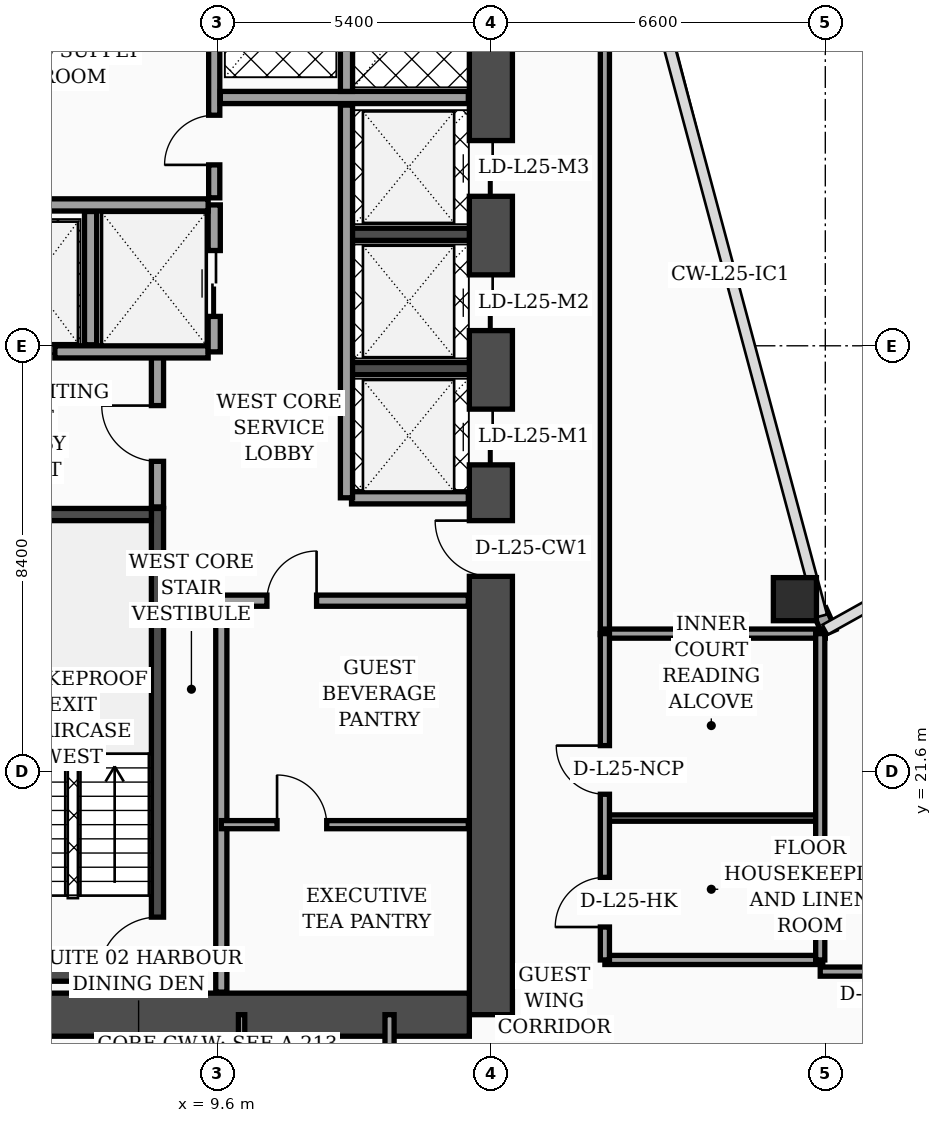
"""IFC4 building model, lengths in metres.
Left out: names, types, materials, properties, quantities, classifications, styles, units other than length and angle.
Written with IfcOpenShell. Run it as: python <this file> out.ifc"""

import sys

from ifc_helpers import new_model, si_unit, direction, frame, frame_2d, origin, origin_2d, place, context, subcontext, project, spatial, rectangle, hollow_rectangle, extrude, element, fill, save


model = new_model("IFC4")
c1 = context("Model", 3, precision=1e-05, world=origin(), true_north=direction((0.0, 1.0)))
c2 = subcontext(c1, "Body", "Model", "MODEL_VIEW")
j1 = project(units=[si_unit("LENGTHUNIT", "METRE"), si_unit("PLANEANGLEUNIT", "RADIAN")], contexts=[c1])
p1 = place(None, origin())
s1 = spatial("IfcSite", under=j1, at=p1, CompositionType="ELEMENT")
p2 = place(p1, origin())
s2 = spatial("IfcBuilding", under=s1, at=p2, CompositionType="ELEMENT")
p3 = place(p2, frame((0.0, 0.0, 105.0)))
s3 = spatial("IfcBuildingStorey", under=s2, at=p3, CompositionType="ELEMENT", Elevation=105.0)
p4 = place(p3, frame((15.0, 16.8, 0.0), z_axis=(0.0, 0.0, 1.0), x_axis=(0.0, 1.0, 0.0)))
e1 = element("IfcWall", 1, at=p4, inside=s3, PredefinedType="SHEAR", context=c2, shape_type="SweptSolid", body=[
    extrude(rectangle(XDim=21.6, YDim=0.85, at=frame_2d((10.8, 0.0))), origin(), (0.0, 0.0, 1.0), 3.56),
])
p5 = place(p4, frame((8.65, 0.0, 0.0)))
e2 = element("IfcOpeningElement", 2, at=p5, cuts=e1, PredefinedType="OPENING", context=c2, shape_type="SweptSolid", body=[
    extrude(rectangle(XDim=1.1, YDim=2.2, at=frame_2d((0.55, 1.1))), frame((0.0, 0.435, 0.0), z_axis=(0.0, -1.0, 0.0), x_axis=(1.0, 0.0, 0.0)), (0.0, 0.0, 1.0), 0.87),
])
p6 = place(p4, frame((10.85, 0.0, 0.0)))
e3 = element("IfcOpeningElement", 3, at=p6, cuts=e1, PredefinedType="OPENING", context=c2, shape_type="SweptSolid", body=[
    extrude(rectangle(XDim=1.1, YDim=2.2, at=frame_2d((0.55, 1.1))), frame((0.0, 0.435, 0.0), z_axis=(0.0, -1.0, 0.0), x_axis=(1.0, 0.0, 0.0)), (0.0, 0.0, 1.0), 0.87),
])
p7 = place(p4, frame((13.5, 0.0, 0.0)))
e4 = element("IfcOpeningElement", 4, at=p7, cuts=e1, PredefinedType="OPENING", context=c2, shape_type="SweptSolid", body=[
    extrude(rectangle(XDim=1.1, YDim=2.2, at=frame_2d((0.55, 1.1))), frame((0.0, 0.435, 0.0), z_axis=(0.0, -1.0, 0.0), x_axis=(1.0, 0.0, 0.0)), (0.0, 0.0, 1.0), 0.87),
])
p8 = place(p4, frame((16.15, 0.0, 0.0)))
e5 = element("IfcOpeningElement", 5, at=p8, cuts=e1, PredefinedType="OPENING", context=c2, shape_type="SweptSolid", body=[
    extrude(rectangle(XDim=1.1, YDim=2.2, at=frame_2d((0.55, 1.1))), frame((0.0, 0.435, 0.0), z_axis=(0.0, -1.0, 0.0), x_axis=(1.0, 0.0, 0.0)), (0.0, 0.0, 1.0), 0.87),
])
p9 = place(p3, frame((4.625, 16.8, 0.0), z_axis=(0.0, 0.0, 1.0), x_axis=(1.0, 0.0, 0.0)))
e6 = element("IfcWall", 6, at=p9, inside=s3, PredefinedType="SHEAR", context=c2, shape_type="SweptSolid", body=[
    extrude(rectangle(XDim=9.95, YDim=0.85, at=frame_2d((4.975, 0.0))), origin(), (0.0, 0.0, 1.0), 3.56),
])
p10 = place(p3, frame((8.42, 17.225, 0.0), z_axis=(0.0, 0.0, 1.0), x_axis=(0.0, 1.0, 0.0)))
e7 = element("IfcWall", 7, at=p10, inside=s3, PredefinedType="SOLIDWALL", context=c2, shape_type="SweptSolid", body=[
    extrude(rectangle(XDim=9.565, YDim=0.24, at=frame_2d((4.782, 0.0))), origin(), (0.0, 0.0, 1.0), 3.56),
])
p11 = place(p10, frame((0.35, 0.0, 0.0)))
e8 = element("IfcOpeningElement", 8, at=p11, cuts=e7, PredefinedType="OPENING", context=c2, shape_type="SweptSolid", body=[
    extrude(rectangle(XDim=1.15, YDim=2.2, at=frame_2d((0.575, 1.1))), frame((0.0, 0.13, 0.0), z_axis=(0.0, -1.0, 0.0), x_axis=(1.0, 0.0, 0.0)), (0.0, 0.0, 1.0), 0.26),
])
for number, where, z_axis, x_axis in (
    (9, (5.2, 17.58, 0.0), (0.0, 0.0, 1.0), (1.0, 0.0, 0.0)),
    (10, (5.2, 26.67, 0.0), (0.0, 0.0, 1.0), (1.0, 0.0, 0.0)),
):
    element("IfcWall", number, at=place(p3, frame(where, z_axis=z_axis, x_axis=x_axis)), inside=s3, PredefinedType="SOLIDWALL", context=c2, shape_type="SweptSolid", body=[
        extrude(rectangle(XDim=3.1, YDim=0.24, at=frame_2d((1.55, 0.0))), origin(), (0.0, 0.0, 1.0), 3.56),
    ])
for number, where, z_axis, x_axis in (
    (11, (12.18, 29.55, 0.0), (0.0, 0.0, 1.0), (1.0, 0.0, 0.0)),
    (12, (12.18, 32.2, 0.0), (0.0, 0.0, 1.0), (1.0, 0.0, 0.0)),
):
    element("IfcWall", number, at=place(p3, frame(where, z_axis=z_axis, x_axis=x_axis)), inside=s3, PredefinedType="SOLIDWALL", context=c2, shape_type="SweptSolid", body=[
        extrude(rectangle(XDim=2.395, YDim=0.24, at=frame_2d((1.198, 0.0))), origin(), (0.0, 0.0, 1.0), 3.56),
    ])
p12 = place(p3, frame((21.0, 25.0, 0.0), z_axis=(0.0, 0.0, 1.0), x_axis=(1.0, 0.0, 0.0)))
e13 = element("IfcColumn", 13, at=p12, inside=s3, PredefinedType="COLUMN", context=c2, shape_type="SweptSolid", body=[
    extrude(hollow_rectangle(XDim=0.85, YDim=0.85, WallThickness=0.036, at=origin_2d()), origin(), (0.0, 0.0, 1.0), 3.56),
])
p13 = place(p3, frame((21.68, 24.34, 0.0), z_axis=(0.0, 0.0, 1.0), x_axis=(-0.40758134973, 0.913168901875, 0.0)))
e14 = element("IfcWall", 14, at=p13, inside=s3, PredefinedType="SOLIDWALL", context=c2, shape_type="SweptSolid", body=[
    extrude(rectangle(XDim=0.471, YDim=0.28, at=frame_2d((0.235, 0.0))), origin(), (0.0, 0.0, 1.0), 3.56),
])
p14 = place(p3, frame((8.42, 26.82, 0.0), z_axis=(0.0, 0.0, 1.0), x_axis=(0.0, 1.0, 0.0)))
e15 = element("IfcWall", 15, at=p14, inside=s3, PredefinedType="SOLIDWALL", context=c2, shape_type="SweptSolid", body=[
    extrude(rectangle(XDim=3.0, YDim=0.24, at=frame_2d((1.5, 0.0))), origin(), (0.0, 0.0, 1.0), 3.56),
])
p15 = place(p14, frame((0.9, 0.0, 0.0)))
e16 = element("IfcOpeningElement", 16, at=p15, cuts=e15, PredefinedType="OPENING", context=c2, shape_type="SweptSolid", body=[
    extrude(rectangle(XDim=1.1, YDim=2.2, at=frame_2d((0.55, 1.1))), frame((0.0, 0.13, 0.0), z_axis=(0.0, -1.0, 0.0), x_axis=(1.0, 0.0, 0.0)), (0.0, 0.0, 1.0), 0.26),
])
p16 = place(p3, frame((4.645, 29.88, 0.0), z_axis=(0.0, 0.0, 1.0), x_axis=(1.0, 0.0, 0.0)))
e17 = element("IfcWall", 17, at=p16, inside=s3, PredefinedType="SOLIDWALL", context=c2, shape_type="SweptSolid", body=[
    extrude(rectangle(XDim=4.775, YDim=0.24, at=frame_2d((2.387, 0.0))), origin(), (0.0, 0.0, 1.0), 3.56),
])
p17 = place(p16, frame((0.45, 0.0, 0.0)))
e18 = element("IfcOpeningElement", 18, at=p17, cuts=e17, PredefinedType="OPENING", context=c2, shape_type="SweptSolid", body=[
    extrude(rectangle(XDim=1.3, YDim=2.35, at=frame_2d((0.65, 1.175))), frame((0.0, 0.13, 0.0), z_axis=(0.0, -1.0, 0.0), x_axis=(1.0, 0.0, 0.0)), (0.0, 0.0, 1.0), 0.26),
])
p18 = place(p3, frame((7.1, 30.02, 0.0), z_axis=(0.0, 0.0, 1.0), x_axis=(0.0, 1.0, 0.0)))
e19 = element("IfcWall", 19, at=p18, inside=s3, PredefinedType="SOLIDWALL", context=c2, shape_type="SweptSolid", body=[
    extrude(rectangle(XDim=2.63, YDim=0.24, at=frame_2d((1.315, 0.0))), origin(), (0.0, 0.0, 1.0), 3.56),
])
p19 = place(p3, frame((9.54, 29.88, 0.0), z_axis=(0.0, 0.0, 1.0), x_axis=(0.0, 1.0, 0.0)))
e20 = element("IfcWall", 20, at=p19, inside=s3, PredefinedType="SOLIDWALL", context=c2, shape_type="SweptSolid", body=[
    extrude(rectangle(XDim=2.9, YDim=0.24, at=frame_2d((1.45, 0.0))), origin(), (0.0, 0.0, 1.0), 3.56),
])
p20 = place(p19, frame((0.7, 0.0, 0.0)))
e21 = element("IfcOpeningElement", 21, at=p20, cuts=e20, PredefinedType="OPENING", context=c2, shape_type="SweptSolid", body=[
    extrude(rectangle(XDim=1.3, YDim=2.35, at=frame_2d((0.65, 1.175))), frame((0.0, 0.13, 0.0), z_axis=(0.0, -1.0, 0.0), x_axis=(1.0, 0.0, 0.0)), (0.0, 0.0, 1.0), 0.26),
])
p21 = place(p3, frame((4.645, 32.78, 0.0), z_axis=(0.0, 0.0, 1.0), x_axis=(1.0, 0.0, 0.0)))
e22 = element("IfcWall", 22, at=p21, inside=s3, PredefinedType="SOLIDWALL", context=c2, shape_type="SweptSolid", body=[
    extrude(rectangle(XDim=4.775, YDim=0.24, at=frame_2d((2.387, 0.0))), origin(), (0.0, 0.0, 1.0), 3.19),
])
p22 = place(p3, frame((9.68, 17.245, 0.0), z_axis=(0.0, 0.0, 1.0), x_axis=(0.0, 1.0, 0.0)))
e23 = element("IfcWall", 23, at=p22, inside=s3, PredefinedType="SOLIDWALL", context=c2, shape_type="SweptSolid", body=[
    extrude(rectangle(XDim=7.755, YDim=0.22, at=frame_2d((3.877, 0.0))), origin(), (0.0, 0.0, 1.0), 3.56),
])
p23 = place(p3, frame((9.54, 32.92, 0.0), z_axis=(0.0, 0.0, 1.0), x_axis=(0.0, 1.0, 0.0)))
e24 = element("IfcWall", 24, at=p23, inside=s3, PredefinedType="SOLIDWALL", context=c2, shape_type="SweptSolid", body=[
    extrude(rectangle(XDim=5.035, YDim=0.22, at=frame_2d((2.518, 0.0))), origin(), (0.0, 0.0, 1.0), 3.56),
])
p24 = place(p23, frame((0.65, 0.0, 0.0)))
e25 = element("IfcOpeningElement", 25, at=p24, cuts=e24, PredefinedType="OPENING", context=c2, shape_type="SweptSolid", body=[
    extrude(rectangle(XDim=0.98, YDim=2.15, at=frame_2d((0.49, 1.075))), frame((0.0, 0.12, 0.0), z_axis=(0.0, -1.0, 0.0), x_axis=(1.0, 0.0, 0.0)), (0.0, 0.0, 1.0), 0.24),
])
p25 = place(p3, frame((9.68, 20.55, 0.0), z_axis=(0.0, 0.0, 1.0), x_axis=(1.0, 0.0, 0.0)))
e26 = element("IfcWall", 26, at=p25, inside=s3, PredefinedType="PARTITIONING", context=c2, shape_type="SweptSolid", body=[
    extrude(rectangle(XDim=4.875, YDim=0.16, at=frame_2d((2.438, 0.0))), origin(), (0.0, 0.0, 1.0), 3.56),
])
p26 = place(p25, frame((1.1, 0.0, 0.0)))
e27 = element("IfcOpeningElement", 27, at=p26, cuts=e26, PredefinedType="OPENING", context=c2, shape_type="SweptSolid", body=[
    extrude(rectangle(XDim=0.98, YDim=2.15, at=frame_2d((0.49, 1.075))), frame((0.0, 0.09, 0.0), z_axis=(0.0, -1.0, 0.0), x_axis=(1.0, 0.0, 0.0)), (0.0, 0.0, 1.0), 0.18),
])
p27 = place(p3, frame((9.68, 24.97, 0.0), z_axis=(0.0, 0.0, 1.0), x_axis=(1.0, 0.0, 0.0)))
e28 = element("IfcWall", 28, at=p27, inside=s3, PredefinedType="SOLIDWALL", context=c2, shape_type="SweptSolid", body=[
    extrude(rectangle(XDim=4.875, YDim=0.22, at=frame_2d((2.438, 0.0))), origin(), (0.0, 0.0, 1.0), 2.84),
])
p28 = place(p27, frame((0.9, 0.0, 0.0)))
e29 = element("IfcOpeningElement", 29, at=p28, cuts=e28, PredefinedType="OPENING", context=c2, shape_type="SweptSolid", body=[
    extrude(rectangle(XDim=0.98, YDim=2.15, at=frame_2d((0.49, 1.075))), frame((0.0, 0.12, 0.0), z_axis=(0.0, -1.0, 0.0), x_axis=(1.0, 0.0, 0.0)), (0.0, 0.0, 1.0), 0.24),
])
p29 = place(p3, frame((12.25, 27.0, 0.0), z_axis=(0.0, 0.0, 1.0), x_axis=(1.0, 0.0, 0.0)))
e30 = element("IfcWall", 30, at=p29, inside=s3, PredefinedType="SOLIDWALL", context=c2, shape_type="SweptSolid", body=[
    extrude(rectangle(XDim=2.305, YDim=0.24, at=frame_2d((1.152, 0.0))), origin(), (0.0, 0.0, 1.0), 3.56),
])
p30 = place(p3, frame((12.15, 27.0, 0.0), z_axis=(0.0, 0.0, 1.0), x_axis=(0.0, 1.0, 0.0)))
e31 = element("IfcWall", 31, at=p30, inside=s3, PredefinedType="SOLIDWALL", context=c2, shape_type="SweptSolid", body=[
    extrude(rectangle(XDim=7.75, YDim=0.24, at=frame_2d((3.875, 0.0))), origin(), (0.0, 0.0, 1.0), 3.56),
])
p31 = place(p3, frame((9.66, 34.9, 0.0), z_axis=(0.0, 0.0, 1.0), x_axis=(1.0, 0.0, 0.0)))
e32 = element("IfcWall", 32, at=p31, inside=s3, PredefinedType="SOLIDWALL", context=c2, shape_type="SweptSolid", body=[
    extrude(rectangle(XDim=4.895, YDim=0.24, at=frame_2d((2.448, 0.0))), origin(), (0.0, 0.0, 1.0), 3.56),
])
p32 = place(p3, frame((12.15, 35.02, 0.0), z_axis=(0.0, 0.0, 1.0), x_axis=(0.0, 1.0, 0.0)))
e33 = element("IfcWall", 33, at=p32, inside=s3, PredefinedType="SOLIDWALL", context=c2, shape_type="SweptSolid", body=[
    extrude(rectangle(XDim=2.935, YDim=0.24, at=frame_2d((1.468, 0.0))), origin(), (0.0, 0.0, 1.0), 3.56),
])
p33 = place(p3, frame((10.08, 14.75, 0.0), z_axis=(0.0, 0.0, 1.0), x_axis=(0.0, 1.0, 0.0)))
e34 = element("IfcWall", 34, at=p33, inside=s3, PredefinedType="PARTITIONING", context=c2, shape_type="SweptSolid", body=[
    extrude(rectangle(XDim=2.05, YDim=0.125, at=frame_2d((1.025, 0.0))), origin(), (0.0, 0.0, 1.0), 3.56),
])
p34 = place(p3, frame((13.0, 2.44, 0.0), z_axis=(0.0, 0.0, 1.0), x_axis=(0.0, 1.0, 0.0)))
e35 = element("IfcWall", 35, at=p34, inside=s3, PredefinedType="PARTITIONING", context=c2, shape_type="SweptSolid", body=[
    extrude(rectangle(XDim=14.36, YDim=0.18, at=frame_2d((7.18, 0.0))), origin(), (0.0, 0.0, 1.0), 2.84),
])
p35 = place(p34, frame((3.01, 0.0, 0.0)))
e36 = element("IfcOpeningElement", 36, at=p35, cuts=e35, PredefinedType="OPENING", context=c2, shape_type="SweptSolid", body=[
    extrude(rectangle(XDim=1.02, YDim=2.2, at=frame_2d((0.51, 1.1))), frame((0.0, 0.1, 0.0), z_axis=(0.0, -1.0, 0.0), x_axis=(1.0, 0.0, 0.0)), (0.0, 0.0, 1.0), 0.2),
])
p36 = place(p34, frame((10.1, 0.0, 0.0)))
e37 = element("IfcOpeningElement", 37, at=p36, cuts=e35, PredefinedType="OPENING", context=c2, shape_type="SweptSolid", body=[
    extrude(rectangle(XDim=1.02, YDim=2.2, at=frame_2d((0.51, 1.1))), frame((0.0, 0.1, 0.0), z_axis=(0.0, -1.0, 0.0), x_axis=(1.0, 0.0, 0.0)), (0.0, 0.0, 1.0), 0.2),
])
p37 = place(p3, frame((17.25, 24.3, 0.0), z_axis=(0.0, 0.0, 1.0), x_axis=(0.0, 1.0, 0.0)))
e38 = element("IfcWall", 38, at=p37, inside=s3, PredefinedType="PARTITIONING", context=c2, shape_type="SweptSolid", body=[
    extrude(rectangle(XDim=17.65, YDim=0.18, at=frame_2d((8.825, 0.0))), origin(), (0.0, 0.0, 1.0), 2.84),
])
p38 = place(p3, frame((17.25, 17.88, 0.0), z_axis=(0.0, 0.0, 1.0), x_axis=(1.0, 0.0, 0.0)))
e39 = element("IfcWall", 39, at=p38, inside=s3, PredefinedType="PARTITIONING", context=c2, shape_type="SweptSolid", body=[
    extrude(rectangle(XDim=4.3, YDim=0.18, at=frame_2d((2.15, 0.0))), origin(), (0.0, 0.0, 1.0), 3.09),
])
p39 = place(p3, frame((17.25, 20.68, 0.0), z_axis=(0.0, 0.0, 1.0), x_axis=(1.0, 0.0, 0.0)))
e40 = element("IfcWall", 40, at=p39, inside=s3, PredefinedType="PARTITIONING", context=c2, shape_type="SweptSolid", body=[
    extrude(rectangle(XDim=4.3, YDim=0.125, at=frame_2d((2.15, 0.0))), origin(), (0.0, 0.0, 1.0), 3.56),
])
p40 = place(p3, frame((17.25, 24.32, 0.0), z_axis=(0.0, 0.0, 1.0), x_axis=(1.0, 0.0, 0.0)))
e41 = element("IfcWall", 41, at=p40, inside=s3, PredefinedType="PARTITIONING", context=c2, shape_type="SweptSolid", body=[
    extrude(rectangle(XDim=4.35, YDim=0.18, at=frame_2d((2.175, 0.0))), origin(), (0.0, 0.0, 1.0), 3.56),
])
p41 = place(p3, frame((21.5, 17.88, 0.0), z_axis=(0.0, 0.0, 1.0), x_axis=(0.0, 1.0, 0.0)))
e42 = element("IfcWall", 42, at=p41, inside=s3, PredefinedType="PARTITIONING", context=c2, shape_type="SweptSolid", body=[
    extrude(rectangle(XDim=6.44, YDim=0.18, at=frame_2d((3.22, 0.0))), origin(), (0.0, 0.0, 1.0), 3.09),
])
p42 = place(p3, frame((17.25, 17.88, 0.0), z_axis=(0.0, 0.0, 1.0), x_axis=(0.0, 1.0, 0.0)))
e43 = element("IfcWall", 43, at=p42, inside=s3, PredefinedType="PARTITIONING", context=c2, shape_type="SweptSolid", body=[
    extrude(rectangle(XDim=6.44, YDim=0.18, at=frame_2d((3.22, 0.0))), origin(), (0.0, 0.0, 1.0), 3.09),
])
p43 = place(p42, frame((0.65, 0.0, 0.0)))
e44 = element("IfcOpeningElement", 44, at=p43, cuts=e43, PredefinedType="OPENING", context=c2, shape_type="SweptSolid", body=[
    extrude(rectangle(XDim=0.98, YDim=2.15, at=frame_2d((0.49, 1.075))), frame((0.0, 0.1, 0.0), z_axis=(0.0, -1.0, 0.0), x_axis=(1.0, 0.0, 0.0)), (0.0, 0.0, 1.0), 0.2),
])
p44 = place(p42, frame((3.27, 0.0, 0.0)))
e45 = element("IfcOpeningElement", 45, at=p44, cuts=e43, PredefinedType="OPENING", context=c2, shape_type="SweptSolid", body=[
    extrude(rectangle(XDim=0.96, YDim=2.2, at=frame_2d((0.48, 1.1))), frame((0.0, 0.1, 0.0), z_axis=(0.0, -1.0, 0.0), x_axis=(1.0, 0.0, 0.0)), (0.0, 0.0, 1.0), 0.2),
])
p45 = place(p3, frame((21.5, 17.65, 0.0), z_axis=(0.0, 0.0, 1.0), x_axis=(1.0, 0.0, 0.0)))
e46 = element("IfcWall", 46, at=p45, inside=s3, PredefinedType="PARTITIONING", context=c2, shape_type="SweptSolid", body=[
    extrude(rectangle(XDim=23.55, YDim=0.18, at=frame_2d((11.775, 0.0))), origin(), (0.0, 0.0, 1.0), 2.84),
])
p46 = place(p45, frame((0.95, 0.0, 0.0)))
e47 = element("IfcOpeningElement", 47, at=p46, cuts=e46, PredefinedType="OPENING", context=c2, shape_type="SweptSolid", body=[
    extrude(rectangle(XDim=1.02, YDim=2.2, at=frame_2d((0.51, 1.1))), frame((0.0, 0.1, 0.0), z_axis=(0.0, -1.0, 0.0), x_axis=(1.0, 0.0, 0.0)), (0.0, 0.0, 1.0), 0.2),
])
p47 = place(p45, frame((12.68, 0.0, 0.0)))
e48 = element("IfcOpeningElement", 48, at=p47, cuts=e46, PredefinedType="OPENING", context=c2, shape_type="SweptSolid", body=[
    extrude(rectangle(XDim=1.02, YDim=2.2, at=frame_2d((0.51, 1.1))), frame((0.0, 0.1, 0.0), z_axis=(0.0, -1.0, 0.0), x_axis=(1.0, 0.0, 0.0)), (0.0, 0.0, 1.0), 0.2),
])
p48 = place(p15, origin())
e49 = element("IfcDoor", 49, at=p48, inside=s3, OperationType="SINGLE_SWING_RIGHT", PredefinedType="DOOR", context=c2, shape_type="SweptSolid", body=[
    extrude(rectangle(XDim=1.1, YDim=2.2, at=frame_2d((0.55, 1.1))), frame((0.0, 0.025, 0.0), z_axis=(0.0, -1.0, 0.0), x_axis=(1.0, 0.0, 0.0)), (0.0, 0.0, 1.0), 0.05),
])
fill(e16, e49)
p49 = place(p17, origin())
e50 = element("IfcDoor", 50, at=p49, inside=s3, OperationType="DOUBLE_DOOR_SLIDING", PredefinedType="DOOR", context=c2, shape_type="SweptSolid", body=[
    extrude(rectangle(XDim=1.3, YDim=2.35, at=frame_2d((0.65, 1.175))), frame((0.0, 0.025, 0.0), z_axis=(0.0, -1.0, 0.0), x_axis=(1.0, 0.0, 0.0)), (0.0, 0.0, 1.0), 0.05),
])
fill(e18, e50)
p50 = place(p20, origin())
e51 = element("IfcDoor", 51, at=p50, inside=s3, OperationType="DOUBLE_DOOR_SLIDING", PredefinedType="DOOR", context=c2, shape_type="SweptSolid", body=[
    extrude(rectangle(XDim=1.3, YDim=2.35, at=frame_2d((0.65, 1.175))), frame((0.0, 0.025, 0.0), z_axis=(0.0, -1.0, 0.0), x_axis=(1.0, 0.0, 0.0)), (0.0, 0.0, 1.0), 0.05),
])
fill(e21, e51)
p51 = place(p24, origin())
e52 = element("IfcDoor", 52, at=p51, inside=s3, OperationType="SINGLE_SWING_LEFT", PredefinedType="DOOR", context=c2, shape_type="SweptSolid", body=[
    extrude(rectangle(XDim=0.98, YDim=2.15, at=frame_2d((0.49, 1.075))), frame((0.0, 0.025, 0.0), z_axis=(0.0, -1.0, 0.0), x_axis=(1.0, 0.0, 0.0)), (0.0, 0.0, 1.0), 0.05),
])
fill(e25, e52)
p52 = place(p26, origin())
e53 = element("IfcDoor", 53, at=p52, inside=s3, OperationType="SINGLE_SWING_LEFT", PredefinedType="DOOR", context=c2, shape_type="SweptSolid", body=[
    extrude(rectangle(XDim=0.98, YDim=2.15, at=frame_2d((0.49, 1.075))), frame((0.0, 0.025, 0.0), z_axis=(0.0, -1.0, 0.0), x_axis=(1.0, 0.0, 0.0)), (0.0, 0.0, 1.0), 0.05),
])
fill(e27, e53)
p53 = place(p28, origin())
e54 = element("IfcDoor", 54, at=p53, inside=s3, OperationType="SINGLE_SWING_RIGHT", PredefinedType="DOOR", context=c2, shape_type="SweptSolid", body=[
    extrude(rectangle(XDim=0.98, YDim=2.15, at=frame_2d((0.49, 1.075))), frame((0.0, 0.025, 0.0), z_axis=(0.0, -1.0, 0.0), x_axis=(1.0, 0.0, 0.0)), (0.0, 0.0, 1.0), 0.05),
])
fill(e29, e54)
p54 = place(p43, origin())
e55 = element("IfcDoor", 55, at=p54, inside=s3, OperationType="SINGLE_SWING_LEFT", PredefinedType="DOOR", context=c2, shape_type="SweptSolid", body=[
    extrude(rectangle(XDim=0.98, YDim=2.15, at=frame_2d((0.49, 1.075))), frame((0.0, 0.025, 0.0), z_axis=(0.0, -1.0, 0.0), x_axis=(1.0, 0.0, 0.0)), (0.0, 0.0, 1.0), 0.05),
])
fill(e44, e55)
p55 = place(p44, origin())
e56 = element("IfcDoor", 56, at=p55, inside=s3, OperationType="SINGLE_SWING_RIGHT", PredefinedType="DOOR", context=c2, shape_type="SweptSolid", body=[
    extrude(rectangle(XDim=0.96, YDim=2.2, at=frame_2d((0.48, 1.1))), frame((0.0, 0.025, 0.0), z_axis=(0.0, -1.0, 0.0), x_axis=(1.0, 0.0, 0.0)), (0.0, 0.0, 1.0), 0.05),
])
fill(e45, e56)
p56 = place(p11, origin())
e57 = element("IfcDoor", 57, at=p56, inside=s3, OperationType="SINGLE_SWING_LEFT", PredefinedType="DOOR", context=c2, shape_type="SweptSolid", body=[
    extrude(rectangle(XDim=1.15, YDim=2.2, at=frame_2d((0.575, 1.1))), frame((0.0, 0.025, 0.0), z_axis=(0.0, -1.0, 0.0), x_axis=(1.0, 0.0, 0.0)), (0.0, 0.0, 1.0), 0.05),
])
fill(e8, e57)
p57 = place(p5, origin())
e58 = element("IfcDoor", 58, at=p57, inside=s3, OperationType="SINGLE_SWING_RIGHT", PredefinedType="DOOR", context=c2, shape_type="SweptSolid", body=[
    extrude(rectangle(XDim=1.1, YDim=2.2, at=frame_2d((0.55, 1.1))), frame((0.0, 0.025, 0.0), z_axis=(0.0, -1.0, 0.0), x_axis=(1.0, 0.0, 0.0)), (0.0, 0.0, 1.0), 0.05),
])
fill(e2, e58)
p58 = place(p6, origin())
e59 = element("IfcDoor", 59, at=p58, inside=s3, OperationType="DOUBLE_DOOR_SLIDING", PredefinedType="DOOR", context=c2, shape_type="SweptSolid", body=[
    extrude(rectangle(XDim=1.1, YDim=2.2, at=frame_2d((0.55, 1.1))), frame((0.0, 0.025, 0.0), z_axis=(0.0, -1.0, 0.0), x_axis=(1.0, 0.0, 0.0)), (0.0, 0.0, 1.0), 0.05),
])
fill(e3, e59)
p59 = place(p7, origin())
e60 = element("IfcDoor", 60, at=p59, inside=s3, OperationType="DOUBLE_DOOR_SLIDING", PredefinedType="DOOR", context=c2, shape_type="SweptSolid", body=[
    extrude(rectangle(XDim=1.1, YDim=2.2, at=frame_2d((0.55, 1.1))), frame((0.0, 0.025, 0.0), z_axis=(0.0, -1.0, 0.0), x_axis=(1.0, 0.0, 0.0)), (0.0, 0.0, 1.0), 0.05),
])
fill(e4, e60)
p60 = place(p8, origin())
e61 = element("IfcDoor", 61, at=p60, inside=s3, OperationType="DOUBLE_DOOR_SLIDING", PredefinedType="DOOR", context=c2, shape_type="SweptSolid", body=[
    extrude(rectangle(XDim=1.1, YDim=2.2, at=frame_2d((0.55, 1.1))), frame((0.0, 0.025, 0.0), z_axis=(0.0, -1.0, 0.0), x_axis=(1.0, 0.0, 0.0)), (0.0, 0.0, 1.0), 0.05),
])
fill(e5, e61)
save(model, sys.argv[1])
